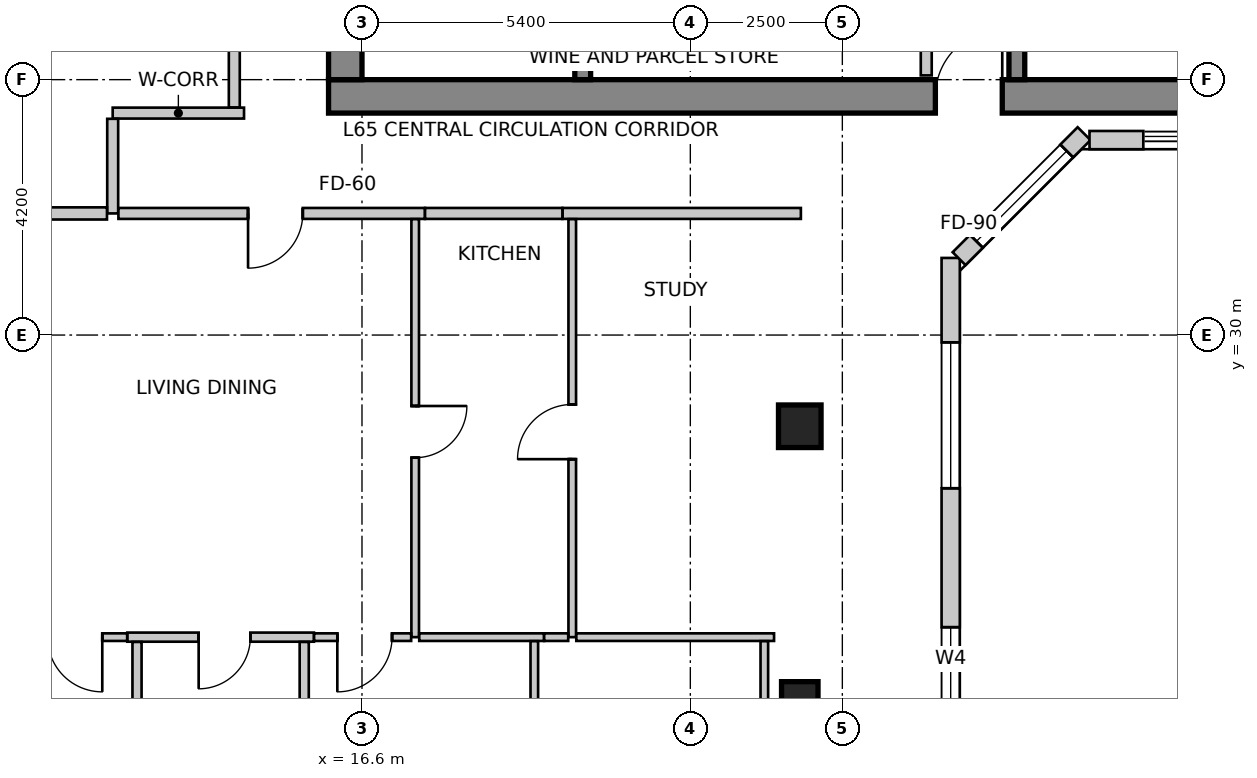
"""IFC4 building model, lengths in metres.
Left out: names, types, materials, properties, quantities, classifications, styles, units other than length and angle.
Written with IfcOpenShell. Run it as: python <this file> out.ifc"""

import sys

from ifc_helpers import new_model, si_unit, direction, frame, frame_2d, origin, origin_2d, place, context, subcontext, project, spatial, rectangle, extrude, source, transform, mapped, element, fill, save


model = new_model("IFC4")
c1 = context("Model", 3, precision=1e-05, world=origin(), true_north=direction((0.0, 1.0)))
c2 = subcontext(c1, "Body", "Model", "MODEL_VIEW")
j1 = project(units=[si_unit("LENGTHUNIT", "METRE"), si_unit("PLANEANGLEUNIT", "RADIAN")], contexts=[c1])
p1 = place(None, origin())
s1 = spatial("IfcSite", under=j1, at=p1, CompositionType="ELEMENT")
p2 = place(p1, origin())
s2 = spatial("IfcBuilding", under=s1, at=p2, CompositionType="ELEMENT")
p3 = place(p2, frame((0.0, 0.0, 256.5)))
s3 = spatial("IfcBuildingStorey", under=s2, at=p3, CompositionType="ELEMENT", Elevation=256.5)
p4 = place(p3, frame((16.05, 33.925, 0.0), z_axis=(0.0, 0.0, 1.0), x_axis=(1.0, 0.0, 0.0)))
e1 = element("IfcWall", 1, at=p4, inside=s3, PredefinedType="SHEAR", context=c2, shape_type="SweptSolid", body=[
    extrude(rectangle(XDim=15.5, YDim=0.55, at=frame_2d((7.75, 0.0))), origin(), (0.0, 0.0, 1.0), 3.6),
])
m1 = source(origin(), c2, "Body", "SweptSolid", [
    extrude(rectangle(XDim=1.1, YDim=2.15, at=frame_2d((0.55, 1.075))), frame((0.0, 0.285, 0.0), z_axis=(0.0, -1.0, 0.0), x_axis=(1.0, 0.0, 0.0)), (0.0, 0.0, 1.0), 0.57),
])
p5 = place(p4, frame((9.98, 0.0, 0.0)))
e2 = element("IfcOpeningElement", 2, at=p5, cuts=e1, PredefinedType="OPENING", context=c2, shape_type="MappedRepresentation", body=[
    mapped(m1, transform((0.0, 0.0, 0.0), scale=1.0)),
])
p6 = place(p3, frame((16.325, 34.2, 0.0), z_axis=(0.0, 0.0, 1.0), x_axis=(0.0, 1.0, 0.0)))
e3 = element("IfcWall", 3, at=p6, inside=s3, PredefinedType="SHEAR", context=c2, shape_type="SweptSolid", body=[
    extrude(rectangle(XDim=11.4, YDim=0.55, at=frame_2d((5.7, 0.0))), origin(), (0.0, 0.0, 1.0), 3.6),
])
p7 = place(p6, frame((7.15, 0.0, 0.0)))
e4 = element("IfcOpeningElement", 4, at=p7, cuts=e3, PredefinedType="OPENING", context=c2, shape_type="MappedRepresentation", body=[
    mapped(m1, transform((0.0, 0.0, 0.0), scale=1.0)),
])
p8 = place(p3, frame((20.23, 34.2, 0.0), z_axis=(0.0, 0.0, 1.0), x_axis=(0.0, 1.0, 0.0)))
e5 = element("IfcWall", 5, at=p8, inside=s3, PredefinedType="SHEAR", context=c2, shape_type="SweptSolid", body=[
    extrude(rectangle(XDim=9.06, YDim=0.26, at=frame_2d((4.53, 0.0))), origin(), (0.0, 0.0, 1.0), 3.6),
])
m2 = source(origin(), c2, "Body", "SweptSolid", [
    extrude(rectangle(XDim=1.1, YDim=2.15, at=frame_2d((0.55, 1.075))), frame((0.0, 0.14, 0.0), z_axis=(0.0, -1.0, 0.0), x_axis=(1.0, 0.0, 0.0)), (0.0, 0.0, 1.0), 0.28),
])
p9 = place(p8, frame((7.45, 0.0, 0.0)))
e6 = element("IfcOpeningElement", 6, at=p9, cuts=e5, PredefinedType="OPENING", context=c2, shape_type="MappedRepresentation", body=[
    mapped(m2, transform((0.0, 0.0, 0.0), scale=1.0)),
])
p10 = place(p3, frame((27.37, 34.2, 0.0), z_axis=(0.0, 0.0, 1.0), x_axis=(0.0, 1.0, 0.0)))
e7 = element("IfcWall", 7, at=p10, inside=s3, PredefinedType="SHEAR", context=c2, shape_type="SweptSolid", body=[
    extrude(rectangle(XDim=9.06, YDim=0.26, at=frame_2d((4.53, 0.0))), origin(), (0.0, 0.0, 1.0), 3.6),
])
p11 = place(p10, frame((7.45, 0.0, 0.0)))
e8 = element("IfcOpeningElement", 8, at=p11, cuts=e7, PredefinedType="OPENING", context=c2, shape_type="MappedRepresentation", body=[
    mapped(m2, transform((0.0, 0.0, 0.0), scale=1.0)),
])
m3 = source(origin(), c2, "Body", "SweptSolid", [
    extrude(rectangle(XDim=0.7, YDim=0.7, at=origin_2d()), origin(), (0.0, 0.0, 1.0), 3.6),
])
p12 = place(p3, frame((23.8, 28.5, 0.0), z_axis=(0.0, 0.0, 1.0), x_axis=(1.0, 0.0, 0.0)))
e9 = element("IfcColumn", 9, at=p12, inside=s3, PredefinedType="COLUMN", context=c2, shape_type="MappedRepresentation", body=[
    mapped(m3, transform((0.0, 0.0, 0.0), scale=1.0)),
])
m4 = source(origin(), c2, "Body", "SweptSolid", [
    extrude(rectangle(XDim=0.6, YDim=0.6, at=origin_2d()), origin(), (0.0, 0.0, 1.0), 3.6),
])
p13 = place(p3, frame((23.8, 24.0, 0.0), z_axis=(0.0, 0.0, 1.0), x_axis=(1.0, 0.0, 0.0)))
e10 = element("IfcColumn", 10, at=p13, inside=s3, PredefinedType="COLUMN", context=c2, shape_type="MappedRepresentation", body=[
    mapped(m4, transform((0.0, 0.0, 0.0), scale=1.0)),
])
p14 = place(p3, frame((26.282, 21.557, 0.0), z_axis=(0.0, 0.0, 1.0), x_axis=(0.0, 1.0, 0.0)))
e11 = element("IfcWall", 11, at=p14, inside=s3, PredefinedType="SOLIDWALL", context=c2, shape_type="SweptSolid", body=[
    extrude(rectangle(XDim=9.711, YDim=0.3, at=frame_2d((4.855, 0.0))), origin(), (0.0, 0.0, 1.0), 3.35),
])
m5 = source(origin(), c2, "Body", "SweptSolid", [
    extrude(rectangle(XDim=2.1, YDim=2.0, at=frame_2d((1.05, 1.0))), frame((0.0, 0.16, 0.0), z_axis=(0.0, -1.0, 0.0), x_axis=(1.0, 0.0, 0.0)), (0.0, 0.0, 1.0), 0.32),
])
p15 = place(p14, frame((1.538, 0.0, 0.85)))
e12 = element("IfcOpeningElement", 12, at=p15, cuts=e11, PredefinedType="OPENING", context=c2, shape_type="MappedRepresentation", body=[
    mapped(m5, transform((0.0, 0.0, 0.0), scale=1.0)),
])
m6 = source(origin(), c2, "Body", "SweptSolid", [
    extrude(rectangle(XDim=2.4, YDim=2.2, at=frame_2d((1.2, 1.1))), frame((0.0, 0.16, 0.0), z_axis=(0.0, -1.0, 0.0), x_axis=(1.0, 0.0, 0.0)), (0.0, 0.0, 1.0), 0.32),
])
p16 = place(p14, frame((5.923, 0.0, 0.85)))
e13 = element("IfcOpeningElement", 13, at=p16, cuts=e11, PredefinedType="OPENING", context=c2, shape_type="MappedRepresentation", body=[
    mapped(m6, transform((0.0, 0.0, 0.0), scale=1.0)),
])
p17 = place(p3, frame((26.42, 31.256, 0.0), z_axis=(0.0, 0.0, 1.0), x_axis=(0.707106781187, 0.707106781187, 0.0)))
e14 = element("IfcWall", 14, at=p17, inside=s3, PredefinedType="SOLIDWALL", context=c2, shape_type="SweptSolid", body=[
    extrude(rectangle(XDim=2.907, YDim=0.3, at=frame_2d((1.454, 0.0))), origin(), (0.0, 0.0, 1.0), 3.35),
])
p18 = place(p17, frame((0.404, 0.0, 0.85)))
e15 = element("IfcOpeningElement", 15, at=p18, cuts=e14, PredefinedType="OPENING", context=c2, shape_type="MappedRepresentation", body=[
    mapped(m5, transform((0.0, 0.0, 0.0), scale=1.0)),
])
p19 = place(p3, frame((28.565, 33.206, 0.0), z_axis=(0.0, 0.0, 1.0), x_axis=(1.0, 0.0, 0.0)))
e16 = element("IfcWall", 16, at=p19, inside=s3, PredefinedType="SOLIDWALL", context=c2, shape_type="SweptSolid", body=[
    extrude(rectangle(XDim=0.885, YDim=0.3, at=frame_2d((0.442, 0.0))), origin(), (0.0, 0.0, 1.0), 3.35),
])
p20 = place(p3, frame((13.269, 47.134, 0.0), z_axis=(0.0, 0.0, 1.0), x_axis=(-0.3199211297, -0.947444178182, 0.0)))
e17 = element("IfcWall", 17, at=p20, inside=s3, PredefinedType="SOLIDWALL", context=c2, shape_type="SweptSolid", body=[
    extrude(rectangle(XDim=16.132, YDim=0.3, at=frame_2d((8.066, 0.0))), origin(), (0.0, 0.0, 1.0), 3.35),
])
p21 = place(p20, frame((2.585, 0.0, 0.85)))
e18 = element("IfcOpeningElement", 18, at=p21, cuts=e17, PredefinedType="OPENING", context=c2, shape_type="MappedRepresentation", body=[
    mapped(m5, transform((0.0, 0.0, 0.0), scale=1.0)),
])
p22 = place(p20, frame((7.267, 0.0, 0.85)))
e19 = element("IfcOpeningElement", 19, at=p22, cuts=e17, PredefinedType="OPENING", context=c2, shape_type="MappedRepresentation", body=[
    mapped(m6, transform((0.0, 0.0, 0.0), scale=1.0)),
])
p23 = place(p20, frame((12.249, 0.0, 0.85)))
e20 = element("IfcOpeningElement", 20, at=p23, cuts=e17, PredefinedType="OPENING", context=c2, shape_type="MappedRepresentation", body=[
    mapped(m5, transform((0.0, 0.0, 0.0), scale=1.0)),
])
p24 = place(p3, frame((25.88, 35.956, 0.0), z_axis=(0.0, 0.0, 1.0), x_axis=(0.0, -1.0, 0.0)))
e21 = element("IfcWall", 21, at=p24, inside=s3, PredefinedType="PARTITIONING", context=c2, shape_type="SweptSolid", body=[
    extrude(rectangle(XDim=1.686, YDim=0.18, at=frame_2d((0.843, 0.0))), origin(), (0.0, 0.0, 1.0), 2.642),
])
p25 = place(p3, frame((12.5, 33.65, 0.0), z_axis=(0.0, 0.0, 1.0), x_axis=(1.0, 0.0, 0.0)))
e22 = element("IfcWall", 22, at=p25, inside=s3, PredefinedType="PARTITIONING", context=c2, shape_type="SweptSolid", body=[
    extrude(rectangle(XDim=2.16, YDim=0.18, at=frame_2d((1.08, 0.0))), origin(), (0.0, 0.0, 1.0), 3.35),
])
p26 = place(p3, frame((12.5, 32.0, 0.0), z_axis=(0.0, 0.0, 1.0), x_axis=(0.0, 1.0, 0.0)))
e23 = element("IfcWall", 23, at=p26, inside=s3, PredefinedType="PARTITIONING", context=c2, shape_type="SweptSolid", body=[
    extrude(rectangle(XDim=1.556, YDim=0.18, at=frame_2d((0.778, 0.0))), origin(), (0.0, 0.0, 1.0), 3.034),
])
p27 = place(p3, frame((23.818, 32.0, 0.0), z_axis=(0.0, 0.0, 1.0), x_axis=(-1.0, 0.0, 0.0)))
e24 = element("IfcWall", 24, at=p27, inside=s3, PredefinedType="PARTITIONING", context=c2, shape_type="SweptSolid", body=[
    extrude(rectangle(XDim=3.92, YDim=0.18, at=frame_2d((1.96, 0.0))), origin(), (0.0, 0.0, 1.0), 3.034),
])
p28 = place(p3, frame((17.635, 32.0, 0.0), z_axis=(0.0, 0.0, 1.0), x_axis=(-1.0, 0.0, 0.0)))
e25 = element("IfcWall", 25, at=p28, inside=s3, PredefinedType="PARTITIONING", context=c2, shape_type="SweptSolid", body=[
    extrude(rectangle(XDim=5.041, YDim=0.18, at=frame_2d((2.521, 0.0))), origin(), (0.0, 0.0, 1.0), 3.034),
])
m7 = source(origin(), c2, "Body", "SweptSolid", [
    extrude(rectangle(XDim=0.9, YDim=2.15, at=frame_2d((0.45, 1.075))), frame((0.0, 0.1, 0.0), z_axis=(0.0, -1.0, 0.0), x_axis=(1.0, 0.0, 0.0)), (0.0, 0.0, 1.0), 0.2),
])
p29 = place(p28, frame((2.009, 0.0, 0.0)))
e26 = element("IfcOpeningElement", 26, at=p29, cuts=e25, PredefinedType="OPENING", context=c2, shape_type="MappedRepresentation", body=[
    mapped(m7, transform((0.0, 0.0, 0.0), scale=1.0)),
])
p30 = place(p3, frame((19.896, 32.0, 0.0), z_axis=(0.0, 0.0, 1.0), x_axis=(-1.0, 0.0, 0.0)))
e27 = element("IfcWall", 27, at=p30, inside=s3, PredefinedType="PARTITIONING", context=c2, shape_type="SweptSolid", body=[
    extrude(rectangle(XDim=2.259, YDim=0.18, at=frame_2d((1.129, 0.0))), origin(), (0.0, 0.0, 1.0), 3.35),
])
p31 = place(p3, frame((14.5, 33.744, 0.0), z_axis=(0.0, 0.0, 1.0), x_axis=(0.0, 1.0, 0.0)))
e28 = element("IfcWall", 28, at=p31, inside=s3, PredefinedType="PARTITIONING", context=c2, shape_type="SweptSolid", body=[
    extrude(rectangle(XDim=12.406, YDim=0.18, at=frame_2d((6.203, 0.0))), origin(), (0.0, 0.0, 1.0), 3.35),
])
p32 = place(p31, frame((4.37, 0.0, 0.0)))
e29 = element("IfcOpeningElement", 29, at=p32, cuts=e28, PredefinedType="OPENING", context=c2, shape_type="MappedRepresentation", body=[
    mapped(m7, transform((0.0, 0.0, 0.0), scale=1.0)),
])
p33 = place(p3, frame((12.406, 32.0, 0.0), z_axis=(0.0, 0.0, 1.0), x_axis=(-1.0, 0.0, 0.0)))
e30 = element("IfcWall", 30, at=p33, inside=s3, PredefinedType="PARTITIONING", context=c2, shape_type="SweptSolid", body=[
    extrude(rectangle(XDim=4.126, YDim=0.2, at=frame_2d((2.063, 0.0))), origin(), (0.0, 0.0, 1.0), 2.642),
])
p34 = place(p3, frame((20.058, 25.032, 0.0), z_axis=(0.0, 0.0, 1.0), x_axis=(0.0, 1.0, 0.0)))
e31 = element("IfcWall", 31, at=p34, inside=s3, PredefinedType="PARTITIONING", context=c2, shape_type="SweptSolid", body=[
    extrude(rectangle(XDim=6.874, YDim=0.125, at=frame_2d((3.437, 0.0))), origin(), (0.0, 0.0, 1.0), 2.922),
])
m8 = source(origin(), c2, "Body", "SweptSolid", [
    extrude(rectangle(XDim=0.9, YDim=2.15, at=frame_2d((0.45, 1.075))), frame((0.0, 0.073, 0.0), z_axis=(0.0, -1.0, 0.0), x_axis=(1.0, 0.0, 0.0)), (0.0, 0.0, 1.0), 0.145),
])
p35 = place(p34, frame((2.927, 0.0, 0.0)))
e32 = element("IfcOpeningElement", 32, at=p35, cuts=e31, PredefinedType="OPENING", context=c2, shape_type="MappedRepresentation", body=[
    mapped(m8, transform((0.0, 0.0, 0.0), scale=1.0)),
])
p36 = place(p3, frame((23.377, 25.032, 0.0), z_axis=(0.0, 0.0, 1.0), x_axis=(-1.0, 0.0, 0.0)))
e33 = element("IfcWall", 33, at=p36, inside=s3, PredefinedType="PARTITIONING", context=c2, shape_type="SweptSolid", body=[
    extrude(rectangle(XDim=3.252, YDim=0.125, at=frame_2d((1.626, 0.0))), origin(), (0.0, 0.0, 1.0), 3.034),
])
p37 = place(p3, frame((17.475, 31.906, 0.0), z_axis=(0.0, 0.0, 1.0), x_axis=(0.0, -1.0, 0.0)))
e34 = element("IfcWall", 34, at=p37, inside=s3, PredefinedType="PARTITIONING", context=c2, shape_type="SweptSolid", body=[
    extrude(rectangle(XDim=6.874, YDim=0.125, at=frame_2d((3.437, 0.0))), origin(), (0.0, 0.0, 1.0), 2.922),
])
m9 = source(origin(), c2, "Body", "SweptSolid", [
    extrude(rectangle(XDim=0.85, YDim=2.15, at=frame_2d((0.425, 1.075))), frame((0.0, 0.073, 0.0), z_axis=(0.0, -1.0, 0.0), x_axis=(1.0, 0.0, 0.0)), (0.0, 0.0, 1.0), 0.145),
])
p38 = place(p37, frame((3.073, 0.0, 0.0)))
e35 = element("IfcOpeningElement", 35, at=p38, cuts=e34, PredefinedType="OPENING", context=c2, shape_type="MappedRepresentation", body=[
    mapped(m9, transform((0.0, 0.0, 0.0), scale=1.0)),
])
p39 = place(p3, frame((15.81, 25.032, 0.0), z_axis=(0.0, 0.0, 1.0), x_axis=(-1.0, 0.0, 0.0)))
e36 = element("IfcWall", 36, at=p39, inside=s3, PredefinedType="PARTITIONING", context=c2, shape_type="SweptSolid", body=[
    extrude(rectangle(XDim=3.07, YDim=0.15, at=frame_2d((1.535, 0.0))), origin(), (0.0, 0.0, 1.0), 2.922),
])
m10 = source(origin(), c2, "Body", "SweptSolid", [
    extrude(rectangle(XDim=0.85, YDim=2.15, at=frame_2d((0.425, 1.075))), frame((0.0, 0.085, 0.0), z_axis=(0.0, -1.0, 0.0), x_axis=(1.0, 0.0, 0.0)), (0.0, 0.0, 1.0), 0.17),
])
p40 = place(p39, frame((1.046, 0.0, 0.0)))
e37 = element("IfcOpeningElement", 37, at=p40, cuts=e36, PredefinedType="OPENING", context=c2, shape_type="MappedRepresentation", body=[
    mapped(m10, transform((0.0, 0.0, 0.0), scale=1.0)),
])
p41 = place(p3, frame((12.738, 25.032, 0.0), z_axis=(0.0, 0.0, 1.0), x_axis=(-1.0, 0.0, 0.0)))
e38 = element("IfcWall", 38, at=p41, inside=s3, PredefinedType="PARTITIONING", context=c2, shape_type="SweptSolid", body=[
    extrude(rectangle(XDim=2.883, YDim=0.125, at=frame_2d((1.441, 0.0))), origin(), (0.0, 0.0, 1.0), 2.642),
])
p42 = place(p41, frame((0.409, 0.0, 0.0)))
e39 = element("IfcOpeningElement", 39, at=p42, cuts=e38, PredefinedType="OPENING", context=c2, shape_type="MappedRepresentation", body=[
    mapped(m8, transform((0.0, 0.0, 0.0), scale=1.0)),
])
p43 = place(p3, frame((17.408, 25.032, 0.0), z_axis=(0.0, 0.0, 1.0), x_axis=(-1.0, 0.0, 0.0)))
e40 = element("IfcWall", 40, at=p43, inside=s3, PredefinedType="PARTITIONING", context=c2, shape_type="SweptSolid", body=[
    extrude(rectangle(XDim=1.596, YDim=0.125, at=frame_2d((0.798, 0.0))), origin(), (0.0, 0.0, 1.0), 3.35),
])
p44 = place(p43, frame((0.314, 0.0, 0.0)))
e41 = element("IfcOpeningElement", 41, at=p44, cuts=e40, PredefinedType="OPENING", context=c2, shape_type="MappedRepresentation", body=[
    mapped(m8, transform((0.0, 0.0, 0.0), scale=1.0)),
])
p45 = place(p3, frame((19.594, 25.032, 0.0), z_axis=(0.0, 0.0, 1.0), x_axis=(-1.0, 0.0, 0.0)))
e42 = element("IfcWall", 42, at=p45, inside=s3, PredefinedType="PARTITIONING", context=c2, shape_type="SweptSolid", body=[
    extrude(rectangle(XDim=2.052, YDim=0.125, at=frame_2d((1.026, 0.0))), origin(), (0.0, 0.0, 1.0), 3.35),
])
p46 = place(p3, frame((19.991, 25.032, 0.0), z_axis=(0.0, 0.0, 1.0), x_axis=(-1.0, 0.0, 0.0)))
e43 = element("IfcWall", 43, at=p46, inside=s3, PredefinedType="PARTITIONING", context=c2, shape_type="SweptSolid", body=[
    extrude(rectangle(XDim=0.396, YDim=0.125, at=frame_2d((0.198, 0.0))), origin(), (0.0, 0.0, 1.0), 3.35),
])
p47 = place(p3, frame((12.9, 18.135, 0.0), z_axis=(0.0, 0.0, 1.0), x_axis=(0.0, 1.0, 0.0)))
e44 = element("IfcWall", 44, at=p47, inside=s3, PredefinedType="PARTITIONING", context=c2, shape_type="SweptSolid", body=[
    extrude(rectangle(XDim=6.818, YDim=0.15, at=frame_2d((3.409, 0.0))), origin(), (0.0, 0.0, 1.0), 2.922),
])
p48 = place(p3, frame((15.65, 24.953, 0.0), z_axis=(0.0, 0.0, 1.0), x_axis=(0.0, -1.0, 0.0)))
e45 = element("IfcWall", 45, at=p48, inside=s3, PredefinedType="PARTITIONING", context=c2, shape_type="SweptSolid", body=[
    extrude(rectangle(XDim=6.888, YDim=0.15, at=frame_2d((3.444, 0.0))), origin(), (0.0, 0.0, 1.0), 2.979),
])
p49 = place(p3, frame((19.434, 24.966, 0.0), z_axis=(0.0, 0.0, 1.0), x_axis=(0.0, -1.0, 0.0)))
e46 = element("IfcWall", 46, at=p49, inside=s3, PredefinedType="PARTITIONING", context=c2, shape_type="SweptSolid", body=[
    extrude(rectangle(XDim=6.901, YDim=0.125, at=frame_2d((3.45, 0.0))), origin(), (0.0, 0.0, 1.0), 2.979),
])
p50 = place(p49, frame((2.94, 0.0, 0.0)))
e47 = element("IfcOpeningElement", 47, at=p50, cuts=e46, PredefinedType="OPENING", context=c2, shape_type="MappedRepresentation", body=[
    mapped(m8, transform((0.0, 0.0, 0.0), scale=1.0)),
])
p51 = place(p3, frame((23.217, 24.966, 0.0), z_axis=(0.0, 0.0, 1.0), x_axis=(0.0, -1.0, 0.0)))
e48 = element("IfcWall", 48, at=p51, inside=s3, PredefinedType="PARTITIONING", context=c2, shape_type="SweptSolid", body=[
    extrude(rectangle(XDim=6.506, YDim=0.125, at=frame_2d((3.253, 0.0))), origin(), (0.0, 0.0, 1.0), 2.979),
])
p52 = place(p51, frame((2.803, 0.0, 0.0)))
e49 = element("IfcOpeningElement", 49, at=p52, cuts=e48, PredefinedType="OPENING", context=c2, shape_type="MappedRepresentation", body=[
    mapped(m8, transform((0.0, 0.0, 0.0), scale=1.0)),
])
m11 = source(origin(), c2, "Body", "SweptSolid", [
    extrude(rectangle(XDim=2.1, YDim=2.0, at=frame_2d((1.05, 1.0))), frame((0.0, -0.015, 0.0), z_axis=(0.0, -1.0, 0.0), x_axis=(1.0, 0.0, 0.0)), (0.0, 0.0, 1.0), 0.06),
])
p53 = place(p15, origin())
e50 = element("IfcWindow", 50, at=p53, inside=s3, PartitioningType="SINGLE_PANEL", PredefinedType="WINDOW", context=c2, shape_type="MappedRepresentation", body=[
    mapped(m11, transform((0.0, 0.0, 0.0), scale=1.0)),
])
fill(e12, e50)
m12 = source(origin(), c2, "Body", "SweptSolid", [
    extrude(rectangle(XDim=2.4, YDim=2.2, at=frame_2d((1.2, 1.1))), frame((0.0, -0.015, 0.0), z_axis=(0.0, -1.0, 0.0), x_axis=(1.0, 0.0, 0.0)), (0.0, 0.0, 1.0), 0.06),
])
p54 = place(p16, origin())
e51 = element("IfcWindow", 51, at=p54, inside=s3, PartitioningType="SINGLE_PANEL", PredefinedType="WINDOW", context=c2, shape_type="MappedRepresentation", body=[
    mapped(m12, transform((0.0, 0.0, 0.0), scale=1.0)),
])
fill(e13, e51)
p55 = place(p18, origin())
e52 = element("IfcWindow", 52, at=p55, inside=s3, PartitioningType="SINGLE_PANEL", PredefinedType="WINDOW", context=c2, shape_type="MappedRepresentation", body=[
    mapped(m11, transform((0.0, 0.0, 0.0), scale=1.0)),
])
fill(e15, e52)
m13 = source(origin(), c2, "Body", "SweptSolid", [
    extrude(rectangle(XDim=1.1, YDim=2.15, at=frame_2d((0.55, 1.075))), frame((0.0, 0.025, 0.0), z_axis=(0.0, -1.0, 0.0), x_axis=(1.0, 0.0, 0.0)), (0.0, 0.0, 1.0), 0.05),
])
p56 = place(p5, origin())
e53 = element("IfcDoor", 53, at=p56, inside=s3, OperationType="SINGLE_SWING_RIGHT", PredefinedType="DOOR", context=c2, shape_type="MappedRepresentation", body=[
    mapped(m13, transform((0.0, 0.0, 0.0), scale=1.0)),
])
fill(e2, e53)
m14 = source(origin(), c2, "Body", "SweptSolid", [
    extrude(rectangle(XDim=0.9, YDim=2.15, at=frame_2d((0.45, 1.075))), frame((0.0, 0.025, 0.0), z_axis=(0.0, -1.0, 0.0), x_axis=(1.0, 0.0, 0.0)), (0.0, 0.0, 1.0), 0.05),
])
p57 = place(p35, origin())
e54 = element("IfcDoor", 54, at=p57, inside=s3, OperationType="SINGLE_SWING_LEFT", PredefinedType="DOOR", context=c2, shape_type="MappedRepresentation", body=[
    mapped(m14, transform((0.0, 0.0, 0.0), scale=1.0)),
])
fill(e32, e54)
m15 = source(origin(), c2, "Body", "SweptSolid", [
    extrude(rectangle(XDim=0.9, YDim=2.15, at=frame_2d((0.45, 1.075))), frame((0.0, 0.025, 0.0), z_axis=(0.0, -1.0, 0.0), x_axis=(1.0, 0.0, 0.0)), (0.0, 0.0, 1.0), 0.05),
])
p58 = place(p29, origin())
e55 = element("IfcDoor", 55, at=p58, inside=s3, OperationType="SINGLE_SWING_RIGHT", PredefinedType="DOOR", context=c2, shape_type="MappedRepresentation", body=[
    mapped(m15, transform((0.0, 0.0, 0.0), scale=1.0)),
])
fill(e26, e55)
m16 = source(origin(), c2, "Body", "SweptSolid", [
    extrude(rectangle(XDim=0.85, YDim=2.15, at=frame_2d((0.425, 1.075))), frame((0.0, 0.025, 0.0), z_axis=(0.0, -1.0, 0.0), x_axis=(1.0, 0.0, 0.0)), (0.0, 0.0, 1.0), 0.05),
])
p59 = place(p38, origin())
e56 = element("IfcDoor", 56, at=p59, inside=s3, OperationType="SINGLE_SWING_LEFT", PredefinedType="DOOR", context=c2, shape_type="MappedRepresentation", body=[
    mapped(m16, transform((0.0, 0.0, 0.0), scale=1.0)),
])
fill(e35, e56)
p60 = place(p40, origin())
e57 = element("IfcDoor", 57, at=p60, inside=s3, OperationType="SINGLE_SWING_RIGHT", PredefinedType="DOOR", context=c2, shape_type="MappedRepresentation", body=[
    mapped(m16, transform((0.0, 0.0, 0.0), scale=1.0)),
])
fill(e37, e57)
p61 = place(p42, origin())
e58 = element("IfcDoor", 58, at=p61, inside=s3, OperationType="SINGLE_SWING_LEFT", PredefinedType="DOOR", context=c2, shape_type="MappedRepresentation", body=[
    mapped(m14, transform((0.0, 0.0, 0.0), scale=1.0)),
])
fill(e39, e58)
p62 = place(p44, origin())
e59 = element("IfcDoor", 59, at=p62, inside=s3, OperationType="SINGLE_SWING_RIGHT", PredefinedType="DOOR", context=c2, shape_type="MappedRepresentation", body=[
    mapped(m14, transform((0.0, 0.0, 0.0), scale=1.0)),
])
fill(e41, e59)
save(model, sys.argv[1])
